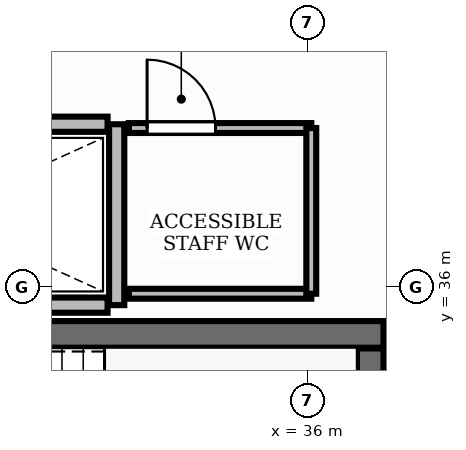
"""IFC4 building model, lengths in metres.
Left out: names, types, materials, properties, quantities, classifications, styles, units other than length and angle.
Written with IfcOpenShell. Run it as: python <this file> out.ifc"""

import sys

from ifc_helpers import new_model, si_unit, direction, frame, frame_2d, origin, place, context, subcontext, project, spatial, rectangle, extrude, element, fill, save


model = new_model("IFC4")
c1 = context("Model", 3, precision=1e-05, world=origin(), true_north=direction((0.0, 1.0)))
c2 = subcontext(c1, "Body", "Model", "MODEL_VIEW")
j1 = project(units=[si_unit("LENGTHUNIT", "METRE"), si_unit("PLANEANGLEUNIT", "RADIAN")], contexts=[c1])
p1 = place(None, origin())
s1 = spatial("IfcSite", under=j1, at=p1, CompositionType="ELEMENT")
p2 = place(p1, origin())
s2 = spatial("IfcBuilding", under=s1, at=p2, CompositionType="ELEMENT")
p3 = place(p2, frame((0.0, 0.0, 301.8)))
s3 = spatial("IfcBuildingStorey", under=s2, at=p3, CompositionType="ELEMENT", Elevation=301.8)
p4 = place(p3, frame((28.852, 35.375, 0.0), z_axis=(0.0, 0.0, 1.0), x_axis=(1.0, 0.0, 0.0)))
e1 = element("IfcWall", 1, at=p4, inside=s3, PredefinedType="SHEAR", context=c2, shape_type="SweptSolid", body=[
    extrude(rectangle(XDim=8.148, YDim=0.35, at=frame_2d((4.074, 0.0))), origin(), (0.0, 0.0, 1.0), 3.9),
])
p5 = place(p3, frame((36.825, 32.11, 0.0), z_axis=(0.0, 0.0, 1.0), x_axis=(0.0, 1.0, 0.0)))
e2 = element("IfcWall", 2, at=p5, inside=s3, PredefinedType="SHEAR", context=c2, shape_type="SweptSolid", body=[
    extrude(rectangle(XDim=3.08, YDim=0.35, at=frame_2d((1.54, 0.0))), origin(), (0.0, 0.0, 1.0), 3.9),
])
p6 = place(p3, frame((33.49, 35.76, 0.0), z_axis=(0.0, 0.0, 1.0), x_axis=(0.0, 1.0, 0.0)))
e3 = element("IfcWall", 3, at=p6, inside=s3, PredefinedType="PARTITIONING", context=c2, shape_type="SweptSolid", body=[
    extrude(rectangle(XDim=2.38, YDim=0.2, at=frame_2d((1.19, 0.0))), origin(), (0.0, 0.0, 1.0), 2.22),
])
for number, where, z_axis, x_axis in (
    (4, (28.8, 35.76, 0.0), (0.0, 0.0, 1.0), (1.0, 0.0, 0.0)),
    (5, (28.8, 38.14, 0.0), (0.0, 0.0, 1.0), (1.0, 0.0, 0.0)),
):
    element("IfcWall", number, at=place(p3, frame(where, z_axis=z_axis, x_axis=x_axis)), inside=s3, PredefinedType="PARTITIONING", context=c2, shape_type="SweptSolid", body=[
        extrude(rectangle(XDim=4.57, YDim=0.2, at=frame_2d((2.285, 0.0))), origin(), (0.0, 0.0, 1.0), 2.22),
    ])
p7 = place(p3, frame((33.65, 38.09, 0.0), z_axis=(0.0, 0.0, 1.0), x_axis=(1.0, 0.0, 0.0)))
e6 = element("IfcWall", 6, at=p7, inside=s3, PredefinedType="PARTITIONING", context=c2, shape_type="SweptSolid", body=[
    extrude(rectangle(XDim=2.4, YDim=0.13, at=frame_2d((1.2, 0.0))), origin(), (0.0, 0.0, 1.0), 2.22),
])
p8 = place(p7, frame((0.24, 0.0, 0.0)))
e7 = element("IfcOpeningElement", 7, at=p8, cuts=e6, PredefinedType="OPENING", context=c2, shape_type="SweptSolid", body=[
    extrude(rectangle(XDim=0.9, YDim=2.15, at=frame_2d((0.45, 1.075))), frame((0.0, 0.08, 0.0), z_axis=(0.0, -1.0, 0.0), x_axis=(1.0, 0.0, 0.0)), (0.0, 0.0, 1.0), 0.16),
])
p9 = place(p3, frame((36.05, 35.91, 0.0), z_axis=(0.0, 0.0, 1.0), x_axis=(-1.0, 0.0, 0.0)))
e8 = element("IfcWall", 8, at=p9, inside=s3, PredefinedType="PARTITIONING", context=c2, shape_type="SweptSolid", body=[
    extrude(rectangle(XDim=2.4, YDim=0.13, at=frame_2d((1.2, 0.0))), origin(), (0.0, 0.0, 1.0), 2.22),
])
p10 = place(p3, frame((36.05, 38.09, 0.0), z_axis=(0.0, 0.0, 1.0), x_axis=(0.0, -1.0, 0.0)))
e9 = element("IfcWall", 9, at=p10, inside=s3, PredefinedType="PARTITIONING", context=c2, shape_type="SweptSolid", body=[
    extrude(rectangle(XDim=2.18, YDim=0.13, at=frame_2d((1.09, 0.0))), origin(), (0.0, 0.0, 1.0), 2.22),
])
p11 = place(p8, origin())
e10 = element("IfcDoor", 10, at=p11, inside=s3, OperationType="SINGLE_SWING_LEFT", PredefinedType="DOOR", context=c2, shape_type="SweptSolid", body=[
    extrude(rectangle(XDim=0.9, YDim=2.15, at=frame_2d((0.45, 1.075))), frame((0.0, 0.025, 0.0), z_axis=(0.0, -1.0, 0.0), x_axis=(1.0, 0.0, 0.0)), (0.0, 0.0, 1.0), 0.05),
])
fill(e7, e10)
save(model, sys.argv[1])
